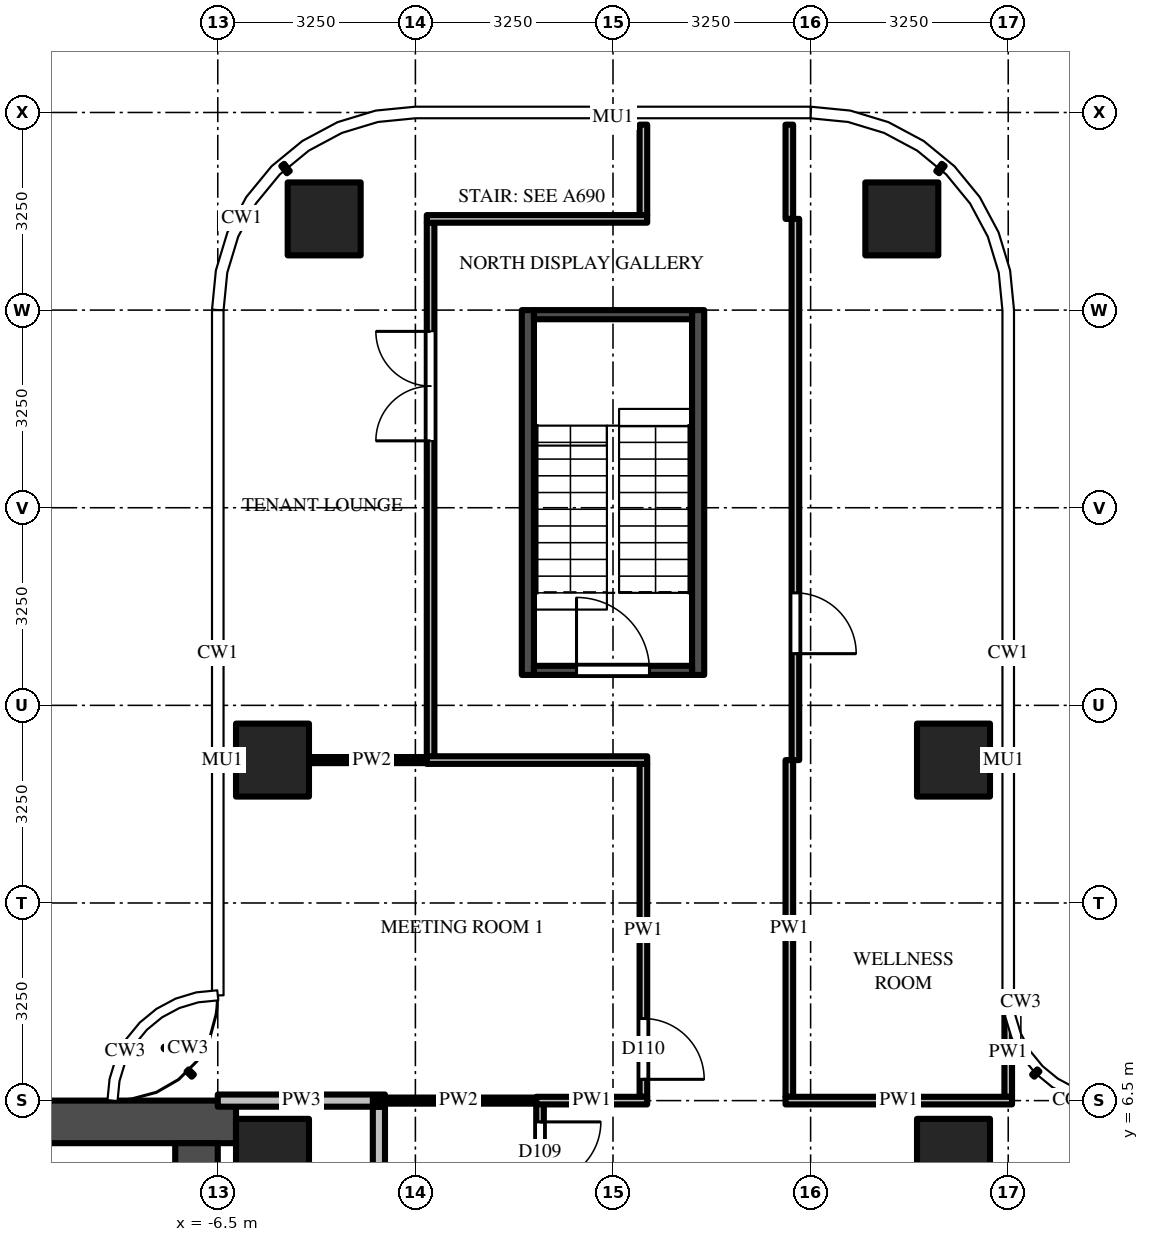
"""IFC4 building model, lengths in metres.
Left out: names, types, materials, properties, quantities, classifications, styles, units other than length and angle.
Written with IfcOpenShell. Run it as: python <this file> out.ifc"""

import sys

from ifc_helpers import new_model, si_unit, direction, frame, frame_2d, origin, origin_2d, place, context, subcontext, project, spatial, rectangle, extrude, source, transform, mapped, element, fill, save


model = new_model("IFC4")
c1 = context("Model", 3, precision=1e-05, world=origin(), true_north=direction((0.0, 1.0)))
c2 = subcontext(c1, "Body", "Model", "MODEL_VIEW")
j1 = project(units=[si_unit("LENGTHUNIT", "METRE"), si_unit("PLANEANGLEUNIT", "RADIAN")], contexts=[c1])
p1 = place(None, origin())
s1 = spatial("IfcSite", under=j1, at=p1, CompositionType="ELEMENT")
p2 = place(p1, origin())
s2 = spatial("IfcBuilding", under=s1, at=p2, CompositionType="ELEMENT")
p3 = place(p2, frame((0.0, 0.0, 208.8)))
s3 = spatial("IfcBuildingStorey", under=s2, at=p3, CompositionType="ELEMENT", Elevation=208.8)
m1 = source(origin(), c2, "Body", "SweptSolid", [
    extrude(rectangle(XDim=1.2, YDim=1.2, at=origin_2d()), origin(), (0.0, 0.0, 1.0), 3.9),
])
for number, where, z_axis, x_axis in (
    (1, (-5.6, 12.1, 0.0), (0.0, 0.0, 1.0), (1.0, 0.0, 0.0)),
    (2, (-4.75, 21.0, 0.0), (0.0, 0.0, 1.0), (1.0, 0.0, 0.0)),
    (3, (5.6, 12.1, 0.0), (0.0, 0.0, 1.0), (1.0, 0.0, 0.0)),
    (4, (4.75, 21.0, 0.0), (0.0, 0.0, 1.0), (1.0, 0.0, 0.0)),
    (5, (5.6, 5.6, 0.0), (0.0, 0.0, 1.0), (1.0, 0.0, 0.0)),
    (6, (-5.6, 5.6, 0.0), (0.0, 0.0, 1.0), (1.0, 0.0, 0.0)),
):
    element("IfcColumn", number, at=place(p3, frame(where, z_axis=z_axis, x_axis=x_axis)), inside=s3, PredefinedType="COLUMN", context=c2, shape_type="MappedRepresentation", body=[
        mapped(m1, transform((0.0, 0.0, 0.0))),
    ])
m2 = source(origin(), c2, "Body", "SweptSolid", [
    extrude(rectangle(XDim=16.55, YDim=0.7, at=frame_2d((8.275, 0.0))), origin(), (0.0, 0.0, 1.0), 3.45),
])
p4 = place(p3, frame((-6.2, 6.15, 0.0), z_axis=(0.0, 0.0, 1.0), x_axis=(-1.0, 0.0, 0.0)))
e7 = element("IfcWall", 7, at=p4, inside=s3, PredefinedType="SHEAR", context=c2, shape_type="MappedRepresentation", body=[
    mapped(m2, transform((0.0, 0.0, 0.0))),
])
m3 = source(origin(), c2, "Body", "SweptSolid", [
    extrude(rectangle(XDim=9.05, YDim=0.7, at=frame_2d((4.525, 0.0))), origin(), (0.0, 0.0, 1.0), 3.45),
])
p5 = place(p3, frame((-6.85, 5.8, 0.0), z_axis=(0.0, 0.0, 1.0), x_axis=(0.0, -1.0, 0.0)))
e8 = element("IfcWall", 8, at=p5, inside=s3, PredefinedType="SHEAR", context=c2, shape_type="MappedRepresentation", body=[
    mapped(m3, transform((0.0, 0.0, 0.0))),
])
m4 = source(origin(), c2, "Body", "SweptSolid", [
    extrude(rectangle(XDim=1.8, YDim=2.1, at=frame_2d((0.9, 1.05))), frame((0.0, 0.36, 0.0), z_axis=(0.0, -1.0, 0.0), x_axis=(1.0, 0.0, 0.0)), (0.0, 0.0, 1.0), 0.72),
])
p6 = place(p5, frame((3.15, 0.0, 0.0)))
e9 = element("IfcOpeningElement", 9, at=p6, cuts=e8, PredefinedType="OPENING", context=c2, shape_type="MappedRepresentation", body=[
    mapped(m4, transform((0.0, 0.0, 0.0))),
])
m5 = source(origin(), c2, "Body", "SweptSolid", [
    extrude(rectangle(XDim=6.0, YDim=0.2, at=frame_2d((3.0, 0.0))), origin(), (0.0, 0.0, 1.0), 3.45),
])
for number, where, z_axis, x_axis in (
    (10, (-1.4, 13.5, 0.0), (0.0, 0.0, 1.0), (0.0, 1.0, 0.0)),
    (11, (1.4, 13.5, 0.0), (0.0, 0.0, 1.0), (0.0, 1.0, 0.0)),
):
    element("IfcWall", number, at=place(p3, frame(where, z_axis=z_axis, x_axis=x_axis)), inside=s3, PredefinedType="SHEAR", context=c2, shape_type="MappedRepresentation", body=[
        mapped(m5, transform((0.0, 0.0, 0.0))),
    ])
m6 = source(origin(), c2, "Body", "SweptSolid", [
    extrude(rectangle(XDim=2.6, YDim=0.15, at=frame_2d((1.3, 0.0))), origin(), (0.0, 0.0, 1.0), 3.45),
])
p7 = place(p3, frame((-1.3, 13.575, 0.0), z_axis=(0.0, 0.0, 1.0), x_axis=(1.0, 0.0, 0.0)))
e12 = element("IfcWall", 12, at=p7, inside=s3, PredefinedType="SHEAR", context=c2, shape_type="MappedRepresentation", body=[
    mapped(m6, transform((0.0, 0.0, 0.0))),
])
m7 = source(origin(), c2, "Body", "SweptSolid", [
    extrude(rectangle(XDim=1.2, YDim=2.1, at=frame_2d((0.6, 1.05))), frame((0.0, 0.085, 0.0), z_axis=(0.0, -1.0, 0.0), x_axis=(1.0, 0.0, 0.0)), (0.0, 0.0, 1.0), 0.17),
])
p8 = place(p7, frame((0.7, 0.0, 0.0)))
e13 = element("IfcOpeningElement", 13, at=p8, cuts=e12, PredefinedType="OPENING", context=c2, shape_type="MappedRepresentation", body=[
    mapped(m7, transform((0.0, 0.0, 0.0))),
])
p9 = place(p3, frame((-1.3, 19.425, 0.0), z_axis=(0.0, 0.0, 1.0), x_axis=(1.0, 0.0, 0.0)))
e14 = element("IfcWall", 14, at=p9, inside=s3, PredefinedType="SHEAR", context=c2, shape_type="MappedRepresentation", body=[
    mapped(m6, transform((0.0, 0.0, 0.0))),
])
p10 = place(p3, frame((-3.85, 3.312, 0.0), z_axis=(0.0, 0.0, 1.0), x_axis=(0.0, 1.0, 0.0)))
e15 = element("IfcWall", 15, at=p10, inside=s3, PredefinedType="PARTITIONING", context=c2, shape_type="SweptSolid", body=[
    extrude(rectangle(XDim=3.087, YDim=0.2, at=frame_2d((1.544, 0.0))), origin(), (0.0, 0.0, 1.0), 2.668),
])
m8 = source(origin(), c2, "Body", "SweptSolid", [
    extrude(rectangle(XDim=8.788, YDim=0.125, at=frame_2d((4.394, 0.0))), origin(), (0.0, 0.0, 1.0), 2.53),
])
p11 = place(p3, frame((-3.0, 12.15, 0.0), z_axis=(0.0, 0.0, 1.0), x_axis=(0.0, 1.0, 0.0)))
e16 = element("IfcWall", 16, at=p11, inside=s3, PredefinedType="PARTITIONING", context=c2, shape_type="MappedRepresentation", body=[
    mapped(m8, transform((0.0, 0.0, 0.0))),
])
m9 = source(origin(), c2, "Body", "SweptSolid", [
    extrude(rectangle(XDim=1.8, YDim=2.1, at=frame_2d((0.9, 1.05))), frame((0.0, 0.073, 0.0), z_axis=(0.0, -1.0, 0.0), x_axis=(1.0, 0.0, 0.0)), (0.0, 0.0, 1.0), 0.145),
])
p12 = place(p11, frame((5.2, 0.0, 0.0)))
e17 = element("IfcOpeningElement", 17, at=p12, cuts=e16, PredefinedType="OPENING", context=c2, shape_type="MappedRepresentation", body=[
    mapped(m9, transform((0.0, 0.0, 0.0))),
])
m10 = source(origin(), c2, "Body", "SweptSolid", [
    extrude(rectangle(XDim=3.137, YDim=0.125, at=frame_2d((1.569, 0.0))), origin(), (0.0, 0.0, 1.0), 2.668),
])
p13 = place(p3, frame((-1.2, 6.45, 0.0), z_axis=(0.0, 0.0, 1.0), x_axis=(0.0, -1.0, 0.0)))
e18 = element("IfcWall", 18, at=p13, inside=s3, PredefinedType="PARTITIONING", context=c2, shape_type="MappedRepresentation", body=[
    mapped(m10, transform((0.0, 0.0, 0.0))),
])
m11 = source(origin(), c2, "Body", "SweptSolid", [
    extrude(rectangle(XDim=1.0, YDim=2.1, at=frame_2d((0.5, 1.05))), frame((0.0, 0.073, 0.0), z_axis=(0.0, -1.0, 0.0), x_axis=(1.0, 0.0, 0.0)), (0.0, 0.0, 1.0), 0.145),
])
p14 = place(p13, frame((0.3, 0.0, 0.0)))
e19 = element("IfcOpeningElement", 19, at=p14, cuts=e18, PredefinedType="OPENING", context=c2, shape_type="MappedRepresentation", body=[
    mapped(m11, transform((0.0, 0.0, 0.0))),
])
m12 = source(origin(), c2, "Body", "SweptSolid", [
    extrude(rectangle(XDim=5.475, YDim=0.125, at=frame_2d((2.738, 0.0))), origin(), (0.0, 0.0, 1.0), 2.668),
])
p15 = place(p3, frame((0.5, 12.038, 0.0), z_axis=(0.0, 0.0, 1.0), x_axis=(0.0, -1.0, 0.0)))
e20 = element("IfcWall", 20, at=p15, inside=s3, PredefinedType="PARTITIONING", context=c2, shape_type="MappedRepresentation", body=[
    mapped(m12, transform((0.0, 0.0, 0.0))),
])
p16 = place(p15, frame((4.188, 0.0, 0.0)))
e21 = element("IfcOpeningElement", 21, at=p16, cuts=e20, PredefinedType="OPENING", context=c2, shape_type="MappedRepresentation", body=[
    mapped(m11, transform((0.0, 0.0, 0.0))),
])
m13 = source(origin(), c2, "Body", "SweptSolid", [
    extrude(rectangle(XDim=1.488, YDim=0.125, at=frame_2d((0.744, 0.0))), origin(), (0.0, 0.0, 1.0), 2.53),
])
p17 = place(p3, frame((0.5, 22.55, 0.0), z_axis=(0.0, 0.0, 1.0), x_axis=(0.0, -1.0, 0.0)))
e22 = element("IfcWall", 22, at=p17, inside=s3, PredefinedType="PARTITIONING", context=c2, shape_type="MappedRepresentation", body=[
    mapped(m13, transform((0.0, 0.0, 0.0))),
])
m14 = source(origin(), c2, "Body", "SweptSolid", [
    extrude(rectangle(XDim=5.538, YDim=0.125, at=frame_2d((2.769, 0.0))), origin(), (0.0, 0.0, 1.0), 2.668),
])
p18 = place(p3, frame((2.9, 12.1, 0.0), z_axis=(0.0, 0.0, 1.0), x_axis=(0.0, -1.0, 0.0)))
e23 = element("IfcWall", 23, at=p18, inside=s3, PredefinedType="PARTITIONING", context=c2, shape_type="MappedRepresentation", body=[
    mapped(m14, transform((0.0, 0.0, 0.0))),
])
p19 = place(p3, frame((2.9, 22.55, 0.0), z_axis=(0.0, 0.0, 1.0), x_axis=(0.0, -1.0, 0.0)))
e24 = element("IfcWall", 24, at=p19, inside=s3, PredefinedType="PARTITIONING", context=c2, shape_type="SweptSolid", body=[
    extrude(rectangle(XDim=1.55, YDim=0.125, at=frame_2d((0.775, 0.0))), origin(), (0.0, 0.0, 1.0), 2.53),
])
p20 = place(p3, frame((3.0, 21.0, 0.0), z_axis=(0.0, 0.0, 1.0), x_axis=(0.0, -1.0, 0.0)))
e25 = element("IfcWall", 25, at=p20, inside=s3, PredefinedType="PARTITIONING", context=c2, shape_type="SweptSolid", body=[
    extrude(rectangle(XDim=8.9, YDim=0.125, at=frame_2d((4.45, 0.0))), origin(), (0.0, 0.0, 1.0), 2.53),
])
p21 = place(p20, frame((6.15, 0.0, 0.0)))
e26 = element("IfcOpeningElement", 26, at=p21, cuts=e25, PredefinedType="OPENING", context=c2, shape_type="MappedRepresentation", body=[
    mapped(m11, transform((0.0, 0.0, 0.0))),
])
m15 = source(origin(), c2, "Body", "SweptSolid", [
    extrude(rectangle(XDim=1.469, YDim=0.125, at=frame_2d((0.734, 0.0))), origin(), (0.0, 0.0, 1.0), 3.45),
])
p22 = place(p3, frame((6.5, 6.562, 0.0), z_axis=(0.0, 0.0, 1.0), x_axis=(0.0, 1.0, 0.0)))
e27 = element("IfcWall", 27, at=p22, inside=s3, PredefinedType="PARTITIONING", context=c2, shape_type="MappedRepresentation", body=[
    mapped(m15, transform((0.0, 0.0, 0.0))),
])
p23 = place(p3, frame((-6.5, 6.5, 0.0), z_axis=(0.0, 0.0, 1.0), x_axis=(1.0, 0.0, 0.0)))
e28 = element("IfcWall", 28, at=p23, inside=s3, PredefinedType="PARTITIONING", context=c2, shape_type="SweptSolid", body=[
    extrude(rectangle(XDim=2.75, YDim=0.2, at=frame_2d((1.375, 0.0))), origin(), (0.0, 0.0, 1.0), 2.53),
])
p24 = place(p3, frame((-3.95, 6.5, 0.0), z_axis=(0.0, 0.0, 1.0), x_axis=(1.0, 0.0, 0.0)))
e29 = element("IfcWall", 29, at=p24, inside=s3, PredefinedType="PARTITIONING", context=c2, shape_type="SweptSolid", body=[
    extrude(rectangle(XDim=2.812, YDim=0.1, at=frame_2d((1.406, 0.0))), origin(), (0.0, 0.0, 1.0), 3.45),
])
m16 = source(origin(), c2, "Body", "SweptSolid", [
    extrude(rectangle(XDim=1.825, YDim=0.125, at=frame_2d((0.913, 0.0))), origin(), (0.0, 0.0, 1.0), 3.45),
])
p25 = place(p3, frame((-1.262, 6.5, 0.0), z_axis=(0.0, 0.0, 1.0), x_axis=(1.0, 0.0, 0.0)))
e30 = element("IfcWall", 30, at=p25, inside=s3, PredefinedType="PARTITIONING", context=c2, shape_type="MappedRepresentation", body=[
    mapped(m16, transform((0.0, 0.0, 0.0))),
])
m17 = source(origin(), c2, "Body", "SweptSolid", [
    extrude(rectangle(XDim=3.725, YDim=0.125, at=frame_2d((1.863, 0.0))), origin(), (0.0, 0.0, 1.0), 2.53),
])
p26 = place(p3, frame((2.837, 6.5, 0.0), z_axis=(0.0, 0.0, 1.0), x_axis=(1.0, 0.0, 0.0)))
e31 = element("IfcWall", 31, at=p26, inside=s3, PredefinedType="PARTITIONING", context=c2, shape_type="MappedRepresentation", body=[
    mapped(m17, transform((0.0, 0.0, 0.0))),
])
m18 = source(origin(), c2, "Body", "SweptSolid", [
    extrude(rectangle(XDim=2.062, YDim=0.1, at=frame_2d((1.031, 0.0))), origin(), (0.0, 0.0, 1.0), 2.668),
])
p27 = place(p3, frame((-5.0, 12.1, 0.0), z_axis=(0.0, 0.0, 1.0), x_axis=(1.0, 0.0, 0.0)))
e32 = element("IfcWall", 32, at=p27, inside=s3, PredefinedType="PARTITIONING", context=c2, shape_type="MappedRepresentation", body=[
    mapped(m18, transform((0.0, 0.0, 0.0))),
])
m19 = source(origin(), c2, "Body", "SweptSolid", [
    extrude(rectangle(XDim=3.625, YDim=0.125, at=frame_2d((1.812, 0.0))), origin(), (0.0, 0.0, 1.0), 2.668),
])
p28 = place(p3, frame((0.562, 12.1, 0.0), z_axis=(0.0, 0.0, 1.0), x_axis=(-1.0, 0.0, 0.0)))
e33 = element("IfcWall", 33, at=p28, inside=s3, PredefinedType="PARTITIONING", context=c2, shape_type="MappedRepresentation", body=[
    mapped(m19, transform((0.0, 0.0, 0.0))),
])
p29 = place(p3, frame((-3.062, 21.0, 0.0), z_axis=(0.0, 0.0, 1.0), x_axis=(1.0, 0.0, 0.0)))
e34 = element("IfcWall", 34, at=p29, inside=s3, PredefinedType="PARTITIONING", context=c2, shape_type="SweptSolid", body=[
    extrude(rectangle(XDim=3.625, YDim=0.125, at=frame_2d((1.812, 0.0))), origin(), (0.0, 0.0, 1.0), 2.53),
])
m20 = source(origin(), c2, "Body", "SweptSolid", [
    extrude(rectangle(XDim=1.2, YDim=2.1, at=frame_2d((0.6, 1.05))), frame((0.0, 0.025, 0.0), z_axis=(0.0, -1.0, 0.0), x_axis=(1.0, 0.0, 0.0)), (0.0, 0.0, 1.0), 0.05),
])
p30 = place(p8, origin())
e35 = element("IfcDoor", 35, at=p30, inside=s3, OperationType="SINGLE_SWING_LEFT", PredefinedType="DOOR", context=c2, shape_type="MappedRepresentation", body=[
    mapped(m20, transform((0.0, 0.0, 0.0))),
])
fill(e13, e35)
m21 = source(origin(), c2, "Body", "SweptSolid", [
    extrude(rectangle(XDim=1.0, YDim=2.1, at=frame_2d((0.5, 1.05))), frame((0.0, 0.025, 0.0), z_axis=(0.0, -1.0, 0.0), x_axis=(1.0, 0.0, 0.0)), (0.0, 0.0, 1.0), 0.05),
])
p31 = place(p14, origin())
e36 = element("IfcDoor", 36, at=p31, inside=s3, OperationType="SINGLE_SWING_LEFT", PredefinedType="DOOR", context=c2, shape_type="MappedRepresentation", body=[
    mapped(m21, transform((0.0, 0.0, 0.0))),
])
fill(e19, e36)
p32 = place(p16, origin())
e37 = element("IfcDoor", 37, at=p32, inside=s3, OperationType="SINGLE_SWING_RIGHT", PredefinedType="DOOR", context=c2, shape_type="MappedRepresentation", body=[
    mapped(m21, transform((0.0, 0.0, 0.0))),
])
fill(e21, e37)
p33 = place(p21, origin())
e38 = element("IfcDoor", 38, at=p33, inside=s3, OperationType="SINGLE_SWING_RIGHT", PredefinedType="DOOR", context=c2, shape_type="MappedRepresentation", body=[
    mapped(m21, transform((0.0, 0.0, 0.0))),
])
fill(e26, e38)
m22 = source(origin(), c2, "Body", "SweptSolid", [
    extrude(rectangle(XDim=1.8, YDim=2.1, at=frame_2d((0.9, 1.05))), frame((0.0, 0.025, 0.0), z_axis=(0.0, -1.0, 0.0), x_axis=(1.0, 0.0, 0.0)), (0.0, 0.0, 1.0), 0.05),
])
p34 = place(p12, origin())
e39 = element("IfcDoor", 39, at=p34, inside=s3, OperationType="DOUBLE_DOOR_SINGLE_SWING", PredefinedType="DOOR", context=c2, shape_type="MappedRepresentation", body=[
    mapped(m22, transform((0.0, 0.0, 0.0))),
])
fill(e17, e39)
save(model, sys.argv[1])
